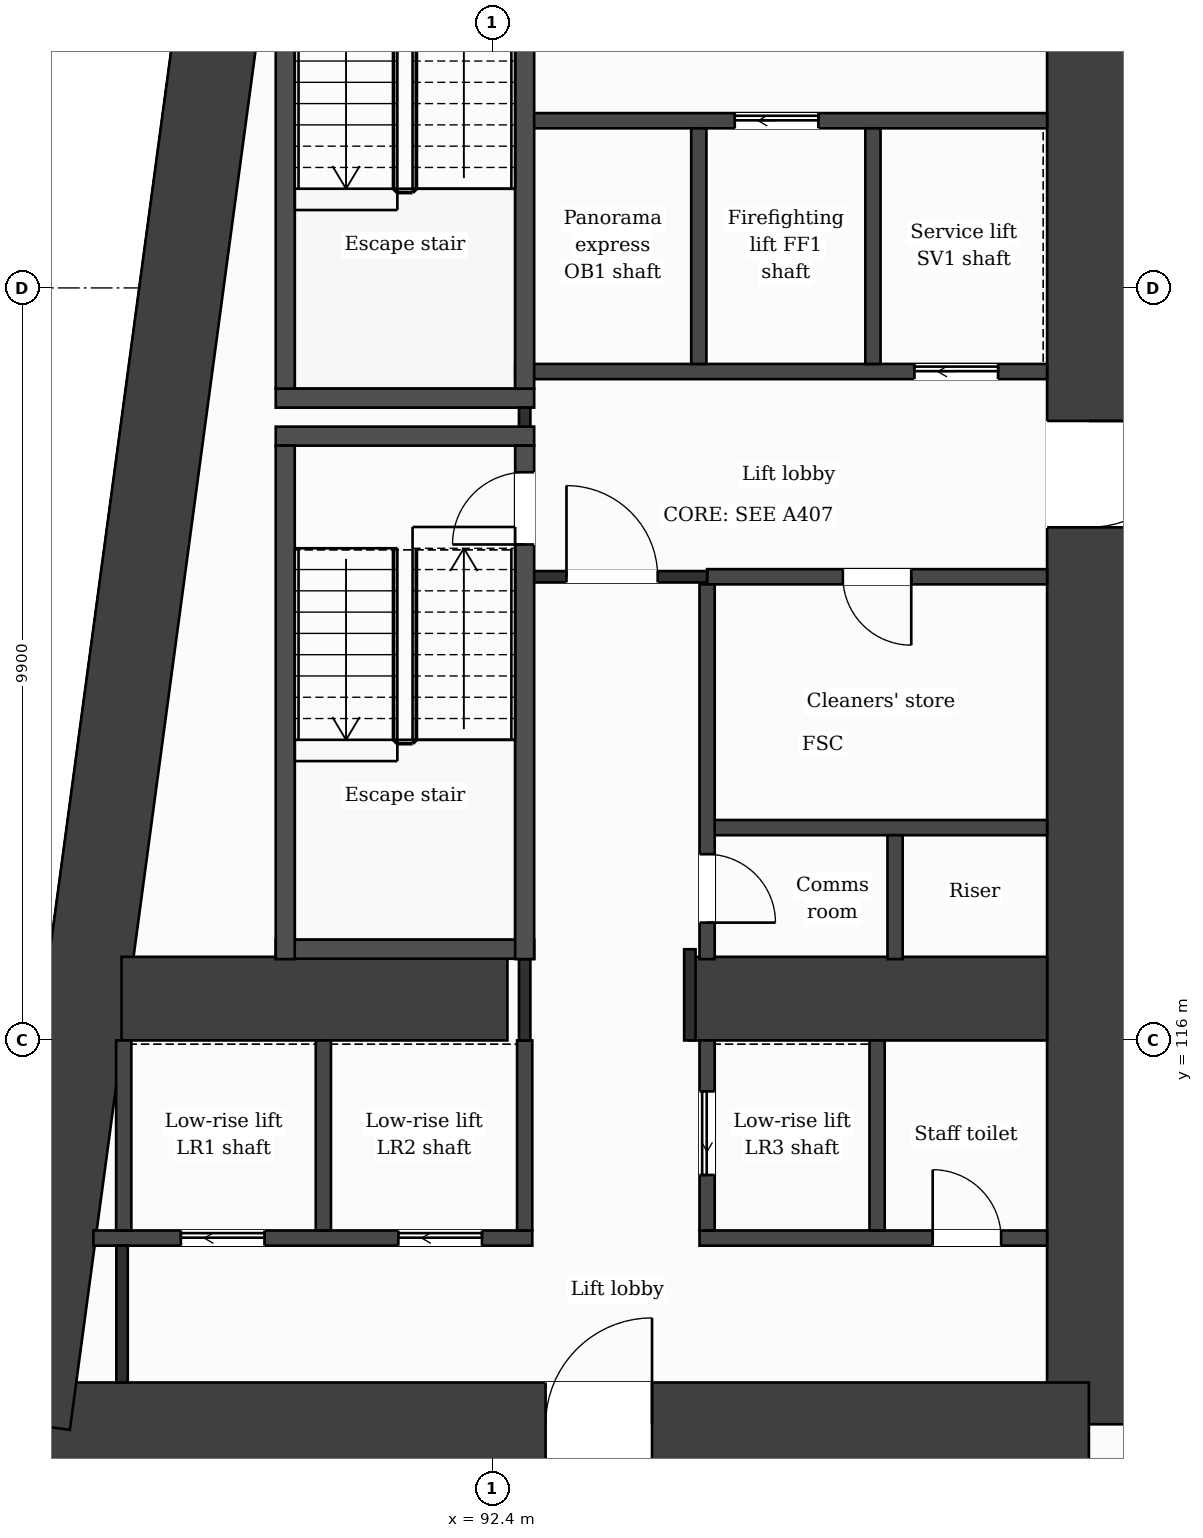
"""IFC4 building model, lengths in metres.
Left out: names, types, materials, properties, quantities, classifications, styles, units other than length and angle.
Written with IfcOpenShell. Run it as: python <this file> out.ifc"""

import sys

from ifc_helpers import new_model, si_unit, direction, frame, frame_2d, origin, place, context, subcontext, project, spatial, rectangle, extrude, element, fill, save


model = new_model("IFC4")
c1 = context("Model", 3, precision=1e-05, world=origin(), true_north=direction((0.0, 1.0)))
c2 = subcontext(c1, "Body", "Model", "MODEL_VIEW")
j1 = project(units=[si_unit("LENGTHUNIT", "METRE"), si_unit("PLANEANGLEUNIT", "RADIAN")], contexts=[c1])
p1 = place(None, origin())
s1 = spatial("IfcSite", under=j1, at=p1, CompositionType="ELEMENT")
p2 = place(p1, origin())
s2 = spatial("IfcBuilding", under=s1, at=p2, CompositionType="ELEMENT")
p3 = place(p2, frame((0.0, 0.0, 39.0)))
s3 = spatial("IfcBuildingStorey", under=s2, at=p3, CompositionType="ELEMENT", Elevation=39.0)
p4 = place(p3, frame((100.25, 131.85, 0.0), z_axis=(0.0, 0.0, 1.0), x_axis=(0.0, -1.0, 0.0)))
e1 = element("IfcWall", 1, at=p4, inside=s3, PredefinedType="SHEAR", context=c2, shape_type="SweptSolid", body=[
    extrude(rectangle(XDim=20.9, YDim=1.1, at=frame_2d((10.45, 0.0))), origin(), (0.0, 0.0, 1.0), 3.5),
])
p5 = place(p4, frame((7.7, 0.0, 0.0)))
e2 = element("IfcOpeningElement", 2, at=p5, cuts=e1, PredefinedType="OPENING", context=c2, shape_type="SweptSolid", body=[
    extrude(rectangle(XDim=1.4, YDim=2.1, at=frame_2d((0.7, 1.05))), frame((0.0, 0.56, 0.0), z_axis=(0.0, -1.0, 0.0), x_axis=(1.0, 0.0, 0.0)), (0.0, 0.0, 1.0), 1.12),
])
p6 = place(p3, frame((100.25, 110.95, 0.0), z_axis=(0.0, 0.0, 1.0), x_axis=(-1.0, 0.0, 0.0)))
e3 = element("IfcWall", 3, at=p6, inside=s3, PredefinedType="SHEAR", context=c2, shape_type="SweptSolid", body=[
    extrude(rectangle(XDim=13.952, YDim=1.1, at=frame_2d((6.976, 0.0))), origin(), (0.0, 0.0, 1.0), 3.5),
])
p7 = place(p6, frame((5.748, 0.0, 0.0)))
e4 = element("IfcOpeningElement", 4, at=p7, cuts=e3, PredefinedType="OPENING", context=c2, shape_type="SweptSolid", body=[
    extrude(rectangle(XDim=1.4, YDim=2.1, at=frame_2d((0.7, 1.05))), frame((0.0, 0.56, 0.0), z_axis=(0.0, -1.0, 0.0), x_axis=(1.0, 0.0, 0.0)), (0.0, 0.0, 1.0), 1.12),
])
p8 = place(p3, frame((86.298, 110.95, 0.0), z_axis=(0.0, 0.0, 1.0), x_axis=(0.133400422634, 0.99106222168, 0.0)))
e5 = element("IfcWall", 5, at=p8, inside=s3, PredefinedType="SHEAR", context=c2, shape_type="SweptSolid", body=[
    extrude(rectangle(XDim=21.089, YDim=1.1, at=frame_2d((10.544, 0.0))), origin(), (0.0, 0.0, 1.0), 3.5),
])
p9 = place(p3, frame((87.523, 116.55, 0.0), z_axis=(0.0, 0.0, 1.0), x_axis=(1.0, 0.0, 0.0)))
e6 = element("IfcWall", 6, at=p9, inside=s3, PredefinedType="SHEAR", context=c2, shape_type="SweptSolid", body=[
    extrude(rectangle(XDim=5.077, YDim=1.1, at=frame_2d((2.539, 0.0))), origin(), (0.0, 0.0, 1.0), 3.5),
])
p10 = place(p3, frame((95.0, 116.55, 0.0), z_axis=(0.0, 0.0, 1.0), x_axis=(1.0, 0.0, 0.0)))
e7 = element("IfcWall", 7, at=p10, inside=s3, PredefinedType="SHEAR", context=c2, shape_type="SweptSolid", body=[
    extrude(rectangle(XDim=4.7, YDim=1.1, at=frame_2d((2.35, 0.0))), origin(), (0.0, 0.0, 1.0), 3.5),
])
p11 = place(p3, frame((87.153, 113.4, 0.0), z_axis=(0.0, 0.0, 1.0), x_axis=(1.0, 0.0, 0.0)))
e8 = element("IfcWall", 8, at=p11, inside=s3, PredefinedType="PARTITIONING", context=c2, shape_type="SweptSolid", body=[
    extrude(rectangle(XDim=5.774, YDim=0.2, at=frame_2d((2.887, 0.0))), origin(), (0.0, 0.0, 1.0), 3.18),
])
p12 = place(p11, frame((1.151, 0.0, 0.0)))
e9 = element("IfcOpeningElement", 9, at=p12, cuts=e8, PredefinedType="OPENING", context=c2, shape_type="SweptSolid", body=[
    extrude(rectangle(XDim=1.1, YDim=2.1, at=frame_2d((0.55, 1.05))), frame((0.0, 0.11, 0.0), z_axis=(0.0, -1.0, 0.0), x_axis=(1.0, 0.0, 0.0)), (0.0, 0.0, 1.0), 0.22),
])
p13 = place(p11, frame((4.012, 0.0, 0.0)))
e10 = element("IfcOpeningElement", 10, at=p13, cuts=e8, PredefinedType="OPENING", context=c2, shape_type="SweptSolid", body=[
    extrude(rectangle(XDim=1.1, YDim=2.1, at=frame_2d((0.55, 1.05))), frame((0.0, 0.11, 0.0), z_axis=(0.0, -1.0, 0.0), x_axis=(1.0, 0.0, 0.0)), (0.0, 0.0, 1.0), 0.22),
])
p14 = place(p3, frame((95.127, 113.4, 0.0), z_axis=(0.0, 0.0, 1.0), x_axis=(1.0, 0.0, 0.0)))
e11 = element("IfcWall", 11, at=p14, inside=s3, PredefinedType="PARTITIONING", context=c2, shape_type="SweptSolid", body=[
    extrude(rectangle(XDim=4.573, YDim=0.2, at=frame_2d((2.287, 0.0))), origin(), (0.0, 0.0, 1.0), 3.18),
])
p15 = place(p14, frame((3.068, 0.0, 0.0)))
e12 = element("IfcOpeningElement", 12, at=p15, cuts=e11, PredefinedType="OPENING", context=c2, shape_type="SweptSolid", body=[
    extrude(rectangle(XDim=0.9, YDim=2.1, at=frame_2d((0.45, 1.05))), frame((0.0, 0.11, 0.0), z_axis=(0.0, -1.0, 0.0), x_axis=(1.0, 0.0, 0.0)), (0.0, 0.0, 1.0), 0.22),
])
p16 = place(p3, frame((89.552, 117.2, 0.0), z_axis=(0.0, 0.0, 1.0), x_axis=(1.0, 0.0, 0.0)))
e13 = element("IfcWall", 13, at=p16, inside=s3, PredefinedType="PARTITIONING", context=c2, shape_type="SweptSolid", body=[
    extrude(rectangle(XDim=3.4, YDim=0.25, at=frame_2d((1.7, 0.0))), origin(), (0.0, 0.0, 1.0), 3.18),
])
p17 = place(p3, frame((95.227, 118.8, 0.0), z_axis=(0.0, 0.0, 1.0), x_axis=(1.0, 0.0, 0.0)))
e14 = element("IfcWall", 14, at=p17, inside=s3, PredefinedType="PARTITIONING", context=c2, shape_type="SweptSolid", body=[
    extrude(rectangle(XDim=4.473, YDim=0.2, at=frame_2d((2.236, 0.0))), origin(), (0.0, 0.0, 1.0), 3.18),
])
p18 = place(p3, frame((95.227, 122.1, 0.0), z_axis=(0.0, 0.0, 1.0), x_axis=(1.0, 0.0, 0.0)))
e15 = element("IfcWall", 15, at=p18, inside=s3, PredefinedType="PARTITIONING", context=c2, shape_type="SweptSolid", body=[
    extrude(rectangle(XDim=4.473, YDim=0.2, at=frame_2d((2.236, 0.0))), origin(), (0.0, 0.0, 1.0), 3.18),
])
p19 = place(p18, frame((1.786, 0.0, 0.0)))
e16 = element("IfcOpeningElement", 16, at=p19, cuts=e15, PredefinedType="OPENING", context=c2, shape_type="SweptSolid", body=[
    extrude(rectangle(XDim=0.9, YDim=2.1, at=frame_2d((0.45, 1.05))), frame((0.0, 0.11, 0.0), z_axis=(0.0, -1.0, 0.0), x_axis=(1.0, 0.0, 0.0)), (0.0, 0.0, 1.0), 0.22),
])
p20 = place(p3, frame((92.827, 122.1, 0.0), z_axis=(0.0, 0.0, 1.0), x_axis=(1.0, 0.0, 0.0)))
e17 = element("IfcWall", 17, at=p20, inside=s3, PredefinedType="PARTITIONING", context=c2, shape_type="SweptSolid", body=[
    extrude(rectangle(XDim=2.4, YDim=0.15, at=frame_2d((1.2, 0.0))), origin(), (0.0, 0.0, 1.0), 3.18),
])
p21 = place(p20, frame((0.55, 0.0, 0.0)))
e18 = element("IfcOpeningElement", 18, at=p21, cuts=e17, PredefinedType="OPENING", context=c2, shape_type="SweptSolid", body=[
    extrude(rectangle(XDim=1.2, YDim=2.1, at=frame_2d((0.6, 1.05))), frame((0.0, 0.085, 0.0), z_axis=(0.0, -1.0, 0.0), x_axis=(1.0, 0.0, 0.0)), (0.0, 0.0, 1.0), 0.17),
])
for number, where, z_axis, x_axis in (
    (19, (89.552, 123.95, 0.0), (0.0, 0.0, 1.0), (1.0, 0.0, 0.0)),
    (20, (89.552, 124.45, 0.0), (0.0, 0.0, 1.0), (1.0, 0.0, 0.0)),
):
    element("IfcWall", number, at=place(p3, frame(where, z_axis=z_axis, x_axis=x_axis)), inside=s3, PredefinedType="PARTITIONING", context=c2, shape_type="SweptSolid", body=[
        extrude(rectangle(XDim=3.4, YDim=0.25, at=frame_2d((1.7, 0.0))), origin(), (0.0, 0.0, 1.0), 3.18),
    ])
p22 = place(p3, frame((92.702, 124.8, 0.0), z_axis=(0.0, 0.0, 1.0), x_axis=(1.0, 0.0, 0.0)))
e21 = element("IfcWall", 21, at=p22, inside=s3, PredefinedType="PARTITIONING", context=c2, shape_type="SweptSolid", body=[
    extrude(rectangle(XDim=6.998, YDim=0.2, at=frame_2d((3.499, 0.0))), origin(), (0.0, 0.0, 1.0), 3.18),
])
p23 = place(p22, frame((5.253, 0.0, 0.0)))
e22 = element("IfcOpeningElement", 22, at=p23, cuts=e21, PredefinedType="OPENING", context=c2, shape_type="SweptSolid", body=[
    extrude(rectangle(XDim=1.1, YDim=2.1, at=frame_2d((0.55, 1.05))), frame((0.0, 0.11, 0.0), z_axis=(0.0, -1.0, 0.0), x_axis=(1.0, 0.0, 0.0)), (0.0, 0.0, 1.0), 0.22),
])
p24 = place(p3, frame((92.827, 128.1, 0.0), z_axis=(0.0, 0.0, 1.0), x_axis=(1.0, 0.0, 0.0)))
e23 = element("IfcWall", 23, at=p24, inside=s3, PredefinedType="PARTITIONING", context=c2, shape_type="SweptSolid", body=[
    extrude(rectangle(XDim=6.873, YDim=0.2, at=frame_2d((3.437, 0.0))), origin(), (0.0, 0.0, 1.0), 3.18),
])
p25 = place(p24, frame((2.764, 0.0, 0.0)))
e24 = element("IfcOpeningElement", 24, at=p25, cuts=e23, PredefinedType="OPENING", context=c2, shape_type="SweptSolid", body=[
    extrude(rectangle(XDim=1.1, YDim=2.1, at=frame_2d((0.55, 1.05))), frame((0.0, 0.11, 0.0), z_axis=(0.0, -1.0, 0.0), x_axis=(1.0, 0.0, 0.0)), (0.0, 0.0, 1.0), 0.22),
])
p26 = place(p3, frame((87.552, 113.5, 0.0), z_axis=(0.0, 0.0, 1.0), x_axis=(0.0, 1.0, 0.0)))
e25 = element("IfcWall", 25, at=p26, inside=s3, PredefinedType="PARTITIONING", context=c2, shape_type="SweptSolid", body=[
    extrude(rectangle(XDim=2.5, YDim=0.2, at=frame_2d((1.25, 0.0))), origin(), (0.0, 0.0, 1.0), 3.18),
])
p27 = place(p3, frame((87.53, 111.5, 0.0), z_axis=(0.0, 0.0, 1.0), x_axis=(0.0, 1.0, 0.0)))
e26 = element("IfcWall", 26, at=p27, inside=s3, PredefinedType="PARTITIONING", context=c2, shape_type="SweptSolid", body=[
    extrude(rectangle(XDim=1.8, YDim=0.15, at=frame_2d((0.9, 0.0))), origin(), (0.0, 0.0, 1.0), 3.18),
])
p28 = place(p3, frame((89.677, 117.07, 0.0), z_axis=(0.0, 0.0, 1.0), x_axis=(0.0, 1.0, 0.0)))
e27 = element("IfcWall", 27, at=p28, inside=s3, PredefinedType="PARTITIONING", context=c2, shape_type="SweptSolid", body=[
    extrude(rectangle(XDim=6.755, YDim=0.25, at=frame_2d((3.377, 0.0))), origin(), (0.0, 0.0, 1.0), 3.18),
])
p29 = place(p3, frame((89.677, 124.575, 0.0), z_axis=(0.0, 0.0, 1.0), x_axis=(0.0, 1.0, 0.0)))
e28 = element("IfcWall", 28, at=p29, inside=s3, PredefinedType="PARTITIONING", context=c2, shape_type="SweptSolid", body=[
    extrude(rectangle(XDim=6.5, YDim=0.25, at=frame_2d((3.25, 0.0))), origin(), (0.0, 0.0, 1.0), 3.18),
])
for number, where, z_axis, x_axis in (
    (29, (90.178, 113.5, 0.0), (0.0, 0.0, 1.0), (0.0, 1.0, 0.0)),
    (30, (92.827, 113.5, 0.0), (0.0, 0.0, 1.0), (0.0, 1.0, 0.0)),
):
    element("IfcWall", number, at=place(p3, frame(where, z_axis=z_axis, x_axis=x_axis)), inside=s3, PredefinedType="PARTITIONING", context=c2, shape_type="SweptSolid", body=[
        extrude(rectangle(XDim=2.5, YDim=0.2, at=frame_2d((1.25, 0.0))), origin(), (0.0, 0.0, 1.0), 3.18),
    ])
p30 = place(p3, frame((92.827, 116.0, 0.0), z_axis=(0.0, 0.0, 1.0), x_axis=(0.0, 1.0, 0.0)))
e31 = element("IfcWall", 31, at=p30, inside=s3, PredefinedType="PARTITIONING", context=c2, shape_type="SweptSolid", body=[
    extrude(rectangle(XDim=1.07, YDim=0.15, at=frame_2d((0.535, 0.0))), origin(), (0.0, 0.0, 1.0), 3.18),
])
p31 = place(p3, frame((92.827, 124.075, 0.0), z_axis=(0.0, 0.0, 1.0), x_axis=(0.0, 1.0, 0.0)))
e32 = element("IfcWall", 32, at=p31, inside=s3, PredefinedType="PARTITIONING", context=c2, shape_type="SweptSolid", body=[
    extrude(rectangle(XDim=0.25, YDim=0.15, at=frame_2d((0.125, 0.0))), origin(), (0.0, 0.0, 1.0), 3.18),
])
p32 = place(p3, frame((92.827, 117.07, 0.0), z_axis=(0.0, 0.0, 1.0), x_axis=(0.0, 1.0, 0.0)))
e33 = element("IfcWall", 33, at=p32, inside=s3, PredefinedType="PARTITIONING", context=c2, shape_type="SweptSolid", body=[
    extrude(rectangle(XDim=6.755, YDim=0.25, at=frame_2d((3.377, 0.0))), origin(), (0.0, 0.0, 1.0), 3.18),
])
p33 = place(p32, frame((5.455, 0.0, 0.0)))
e34 = element("IfcOpeningElement", 34, at=p33, cuts=e33, PredefinedType="OPENING", context=c2, shape_type="SweptSolid", body=[
    extrude(rectangle(XDim=0.95, YDim=2.1, at=frame_2d((0.475, 1.05))), frame((0.0, 0.135, 0.0), z_axis=(0.0, -1.0, 0.0), x_axis=(1.0, 0.0, 0.0)), (0.0, 0.0, 1.0), 0.27),
])
p34 = place(p3, frame((92.827, 124.575, 0.0), z_axis=(0.0, 0.0, 1.0), x_axis=(0.0, 1.0, 0.0)))
e35 = element("IfcWall", 35, at=p34, inside=s3, PredefinedType="PARTITIONING", context=c2, shape_type="SweptSolid", body=[
    extrude(rectangle(XDim=6.755, YDim=0.25, at=frame_2d((3.377, 0.0))), origin(), (0.0, 0.0, 1.0), 3.18),
])
p35 = place(p34, frame((5.325, 0.0, 0.0)))
e36 = element("IfcOpeningElement", 36, at=p35, cuts=e35, PredefinedType="OPENING", context=c2, shape_type="SweptSolid", body=[
    extrude(rectangle(XDim=1.0, YDim=2.1, at=frame_2d((0.5, 1.05))), frame((0.0, 0.135, 0.0), z_axis=(0.0, -1.0, 0.0), x_axis=(1.0, 0.0, 0.0)), (0.0, 0.0, 1.0), 0.27),
])
p36 = place(p3, frame((95.0, 116.0, 0.0), z_axis=(0.0, 0.0, 1.0), x_axis=(0.0, 1.0, 0.0)))
e37 = element("IfcWall", 37, at=p36, inside=s3, PredefinedType="PARTITIONING", context=c2, shape_type="SweptSolid", body=[
    extrude(rectangle(XDim=1.2, YDim=0.15, at=frame_2d((0.6, 0.0))), origin(), (0.0, 0.0, 1.0), 3.18),
])
p37 = place(p3, frame((95.118, 124.9, 0.0), z_axis=(0.0, 0.0, 1.0), x_axis=(0.0, 1.0, 0.0)))
e38 = element("IfcWall", 38, at=p37, inside=s3, PredefinedType="PARTITIONING", context=c2, shape_type="SweptSolid", body=[
    extrude(rectangle(XDim=3.1, YDim=0.2, at=frame_2d((1.55, 0.0))), origin(), (0.0, 0.0, 1.0), 3.18),
])
p38 = place(p3, frame((95.227, 113.5, 0.0), z_axis=(0.0, 0.0, 1.0), x_axis=(0.0, 1.0, 0.0)))
e39 = element("IfcWall", 39, at=p38, inside=s3, PredefinedType="PARTITIONING", context=c2, shape_type="SweptSolid", body=[
    extrude(rectangle(XDim=2.5, YDim=0.2, at=frame_2d((1.25, 0.0))), origin(), (0.0, 0.0, 1.0), 3.18),
])
p39 = place(p38, frame((0.73, 0.0, 0.0)))
e40 = element("IfcOpeningElement", 40, at=p39, cuts=e39, PredefinedType="OPENING", context=c2, shape_type="SweptSolid", body=[
    extrude(rectangle(XDim=1.1, YDim=2.1, at=frame_2d((0.55, 1.05))), frame((0.0, 0.11, 0.0), z_axis=(0.0, -1.0, 0.0), x_axis=(1.0, 0.0, 0.0)), (0.0, 0.0, 1.0), 0.22),
])
p40 = place(p3, frame((95.227, 117.07, 0.0), z_axis=(0.0, 0.0, 1.0), x_axis=(0.0, 1.0, 0.0)))
e41 = element("IfcWall", 41, at=p40, inside=s3, PredefinedType="PARTITIONING", context=c2, shape_type="SweptSolid", body=[
    extrude(rectangle(XDim=4.93, YDim=0.2, at=frame_2d((2.465, 0.0))), origin(), (0.0, 0.0, 1.0), 3.18),
])
p41 = place(p40, frame((0.48, 0.0, 0.0)))
e42 = element("IfcOpeningElement", 42, at=p41, cuts=e41, PredefinedType="OPENING", context=c2, shape_type="SweptSolid", body=[
    extrude(rectangle(XDim=0.9, YDim=2.1, at=frame_2d((0.45, 1.05))), frame((0.0, 0.11, 0.0), z_axis=(0.0, -1.0, 0.0), x_axis=(1.0, 0.0, 0.0)), (0.0, 0.0, 1.0), 0.22),
])
p42 = place(p3, frame((97.409, 124.9, 0.0), z_axis=(0.0, 0.0, 1.0), x_axis=(0.0, 1.0, 0.0)))
e43 = element("IfcWall", 43, at=p42, inside=s3, PredefinedType="PARTITIONING", context=c2, shape_type="SweptSolid", body=[
    extrude(rectangle(XDim=3.1, YDim=0.2, at=frame_2d((1.55, 0.0))), origin(), (0.0, 0.0, 1.0), 3.18),
])
p43 = place(p3, frame((97.463, 113.5, 0.0), z_axis=(0.0, 0.0, 1.0), x_axis=(0.0, 1.0, 0.0)))
e44 = element("IfcWall", 44, at=p43, inside=s3, PredefinedType="PARTITIONING", context=c2, shape_type="SweptSolid", body=[
    extrude(rectangle(XDim=2.5, YDim=0.2, at=frame_2d((1.25, 0.0))), origin(), (0.0, 0.0, 1.0), 3.18),
])
p44 = place(p3, frame((97.7, 117.07, 0.0), z_axis=(0.0, 0.0, 1.0), x_axis=(0.0, 1.0, 0.0)))
e45 = element("IfcWall", 45, at=p44, inside=s3, PredefinedType="PARTITIONING", context=c2, shape_type="SweptSolid", body=[
    extrude(rectangle(XDim=1.63, YDim=0.2, at=frame_2d((0.815, 0.0))), origin(), (0.0, 0.0, 1.0), 3.18),
])
p45 = place(p21, origin())
e46 = element("IfcDoor", 46, at=p45, inside=s3, OperationType="SINGLE_SWING_LEFT", PredefinedType="DOOR", context=c2, shape_type="SweptSolid", body=[
    extrude(rectangle(XDim=1.2, YDim=2.1, at=frame_2d((0.6, 1.05))), frame((0.0, 0.025, 0.0), z_axis=(0.0, -1.0, 0.0), x_axis=(1.0, 0.0, 0.0)), (0.0, 0.0, 1.0), 0.05),
])
fill(e18, e46)
p46 = place(p25, origin())
e47 = element("IfcDoor", 47, at=p46, inside=s3, OperationType="SLIDING_TO_LEFT", PredefinedType="DOOR", context=c2, shape_type="SweptSolid", body=[
    extrude(rectangle(XDim=1.1, YDim=2.1, at=frame_2d((0.55, 1.05))), frame((0.0, 0.025, 0.0), z_axis=(0.0, -1.0, 0.0), x_axis=(1.0, 0.0, 0.0)), (0.0, 0.0, 1.0), 0.05),
])
fill(e24, e47)
p47 = place(p23, origin())
e48 = element("IfcDoor", 48, at=p47, inside=s3, OperationType="SLIDING_TO_LEFT", PredefinedType="DOOR", context=c2, shape_type="SweptSolid", body=[
    extrude(rectangle(XDim=1.1, YDim=2.1, at=frame_2d((0.55, 1.05))), frame((0.0, 0.025, 0.0), z_axis=(0.0, -1.0, 0.0), x_axis=(1.0, 0.0, 0.0)), (0.0, 0.0, 1.0), 0.05),
])
fill(e22, e48)
p48 = place(p19, origin())
e49 = element("IfcDoor", 49, at=p48, inside=s3, OperationType="SINGLE_SWING_RIGHT", PredefinedType="DOOR", context=c2, shape_type="SweptSolid", body=[
    extrude(rectangle(XDim=0.9, YDim=2.1, at=frame_2d((0.45, 1.05))), frame((0.0, 0.025, 0.0), z_axis=(0.0, -1.0, 0.0), x_axis=(1.0, 0.0, 0.0)), (0.0, 0.0, 1.0), 0.05),
])
fill(e16, e49)
p49 = place(p33, origin())
e50 = element("IfcDoor", 50, at=p49, inside=s3, OperationType="SINGLE_SWING_LEFT", PredefinedType="DOOR", context=c2, shape_type="SweptSolid", body=[
    extrude(rectangle(XDim=0.95, YDim=2.1, at=frame_2d((0.475, 1.05))), frame((0.0, 0.025, 0.0), z_axis=(0.0, -1.0, 0.0), x_axis=(1.0, 0.0, 0.0)), (0.0, 0.0, 1.0), 0.05),
])
fill(e34, e50)
p50 = place(p41, origin())
e51 = element("IfcDoor", 51, at=p50, inside=s3, OperationType="SINGLE_SWING_LEFT", PredefinedType="DOOR", context=c2, shape_type="SweptSolid", body=[
    extrude(rectangle(XDim=0.9, YDim=2.1, at=frame_2d((0.45, 1.05))), frame((0.0, 0.025, 0.0), z_axis=(0.0, -1.0, 0.0), x_axis=(1.0, 0.0, 0.0)), (0.0, 0.0, 1.0), 0.05),
])
fill(e42, e51)
p51 = place(p12, origin())
e52 = element("IfcDoor", 52, at=p51, inside=s3, OperationType="SLIDING_TO_LEFT", PredefinedType="DOOR", context=c2, shape_type="SweptSolid", body=[
    extrude(rectangle(XDim=1.1, YDim=2.1, at=frame_2d((0.55, 1.05))), frame((0.0, 0.025, 0.0), z_axis=(0.0, -1.0, 0.0), x_axis=(1.0, 0.0, 0.0)), (0.0, 0.0, 1.0), 0.05),
])
fill(e9, e52)
p52 = place(p13, origin())
e53 = element("IfcDoor", 53, at=p52, inside=s3, OperationType="SLIDING_TO_LEFT", PredefinedType="DOOR", context=c2, shape_type="SweptSolid", body=[
    extrude(rectangle(XDim=1.1, YDim=2.1, at=frame_2d((0.55, 1.05))), frame((0.0, 0.025, 0.0), z_axis=(0.0, -1.0, 0.0), x_axis=(1.0, 0.0, 0.0)), (0.0, 0.0, 1.0), 0.05),
])
fill(e10, e53)
p53 = place(p39, origin())
e54 = element("IfcDoor", 54, at=p53, inside=s3, OperationType="SLIDING_TO_LEFT", PredefinedType="DOOR", context=c2, shape_type="SweptSolid", body=[
    extrude(rectangle(XDim=1.1, YDim=2.1, at=frame_2d((0.55, 1.05))), frame((0.0, 0.025, 0.0), z_axis=(0.0, -1.0, 0.0), x_axis=(1.0, 0.0, 0.0)), (0.0, 0.0, 1.0), 0.05),
])
fill(e40, e54)
p54 = place(p15, origin())
e55 = element("IfcDoor", 55, at=p54, inside=s3, OperationType="SINGLE_SWING_LEFT", PredefinedType="DOOR", context=c2, shape_type="SweptSolid", body=[
    extrude(rectangle(XDim=0.9, YDim=2.1, at=frame_2d((0.45, 1.05))), frame((0.0, 0.025, 0.0), z_axis=(0.0, -1.0, 0.0), x_axis=(1.0, 0.0, 0.0)), (0.0, 0.0, 1.0), 0.05),
])
fill(e12, e55)
p55 = place(p7, origin())
e56 = element("IfcDoor", 56, at=p55, inside=s3, OperationType="SINGLE_SWING_LEFT", PredefinedType="DOOR", context=c2, shape_type="SweptSolid", body=[
    extrude(rectangle(XDim=1.4, YDim=2.1, at=frame_2d((0.7, 1.05))), frame((0.0, 0.025, 0.0), z_axis=(0.0, -1.0, 0.0), x_axis=(1.0, 0.0, 0.0)), (0.0, 0.0, 1.0), 0.05),
])
fill(e4, e56)
p56 = place(p5, origin())
e57 = element("IfcDoor", 57, at=p56, inside=s3, OperationType="SINGLE_SWING_LEFT", PredefinedType="DOOR", context=c2, shape_type="SweptSolid", body=[
    extrude(rectangle(XDim=1.4, YDim=2.1, at=frame_2d((0.7, 1.05))), frame((0.0, 0.025, 0.0), z_axis=(0.0, -1.0, 0.0), x_axis=(1.0, 0.0, 0.0)), (0.0, 0.0, 1.0), 0.05),
])
fill(e2, e57)
save(model, sys.argv[1])
